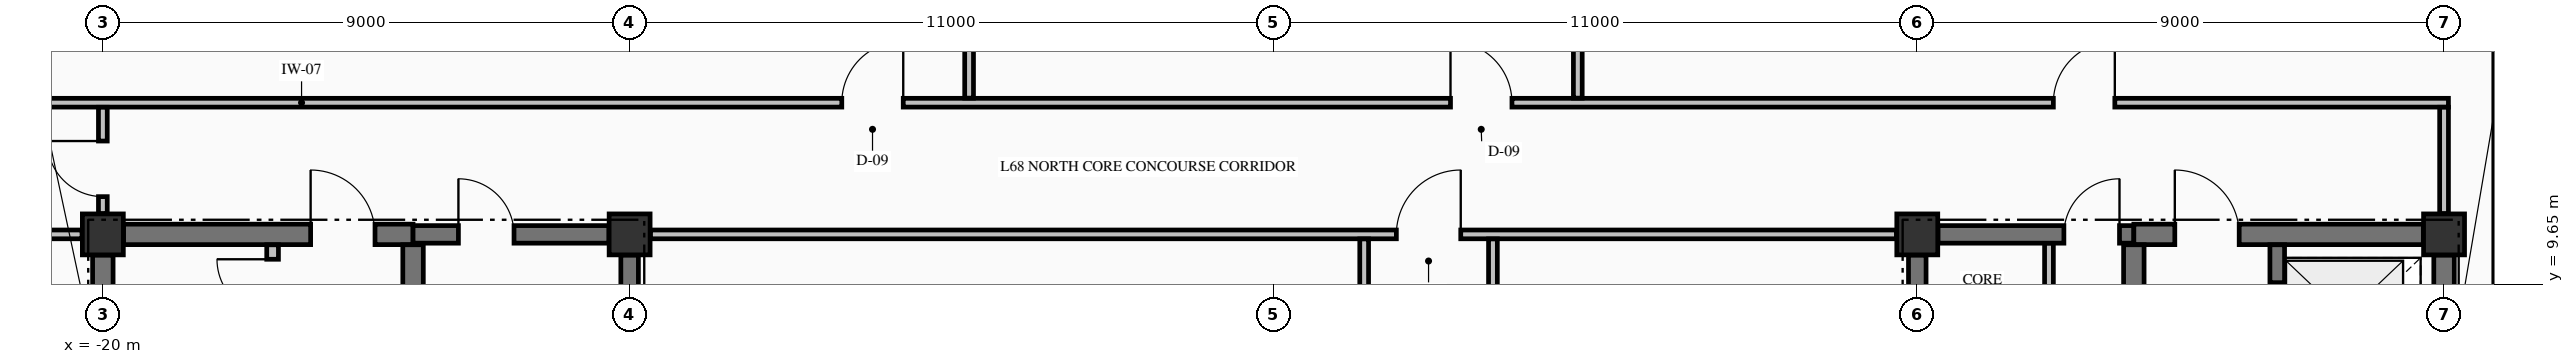
"""IFC4 building model, lengths in metres.
Left out: names, types, materials, properties, quantities, classifications, styles, units other than length and angle.
Written with IfcOpenShell. Run it as: python <this file> out.ifc"""

import sys

from ifc_helpers import new_model, si_unit, direction, frame, frame_2d, origin, origin_2d, place, context, subcontext, project, spatial, rectangle, extrude, element, fill, save


model = new_model("IFC4")
c1 = context("Model", 3, precision=1e-05, world=origin(), true_north=direction((0.0, 1.0)))
c2 = subcontext(c1, "Body", "Model", "MODEL_VIEW")
j1 = project(units=[si_unit("LENGTHUNIT", "METRE"), si_unit("PLANEANGLEUNIT", "RADIAN")], contexts=[c1])
p1 = place(None, origin())
s1 = spatial("IfcSite", under=j1, at=p1, CompositionType="ELEMENT")
p2 = place(p1, origin())
s2 = spatial("IfcBuilding", under=s1, at=p2, CompositionType="ELEMENT")
p3 = place(p2, frame((0.0, 0.0, 257.66)))
s3 = spatial("IfcBuildingStorey", under=s2, at=p3, CompositionType="ELEMENT", Elevation=257.66)
for number, where, z_axis, x_axis in (
    (1, (-20.0, 10.5, -0.25), (0.0, 0.0, 1.0), (1.0, 0.0, 0.0)),
    (2, (-11.0, 10.5, -0.25), (0.0, 0.0, 1.0), (1.0, 0.0, 0.0)),
    (3, (11.0, 10.5, -0.25), (0.0, 0.0, 1.0), (1.0, 0.0, 0.0)),
    (4, (20.0, 10.5, -0.25), (0.0, 0.0, 1.0), (1.0, 0.0, 0.0)),
):
    element("IfcColumn", number, at=place(p3, frame(where, z_axis=z_axis, x_axis=x_axis)), inside=s3, PredefinedType="COLUMN", context=c2, shape_type="SweptSolid", body=[
        extrude(rectangle(XDim=0.7, YDim=0.7, at=origin_2d()), origin(), (0.0, 0.0, 1.0), 3.23),
    ])
p4 = place(p3, frame((21.0, 9.455, 0.0), z_axis=(0.0, 0.0, 1.0), x_axis=(0.0, 1.0, 0.0)))
e5 = element("IfcWall", 5, at=p4, inside=s3, PredefinedType="STANDARD", context=c2, shape_type="SweptSolid", body=[
    extrude(rectangle(XDim=8.09, YDim=0.3, at=frame_2d((4.045, 0.0))), origin(), (0.0, 0.0, 1.0), 2.372),
])
p5 = place(p3, frame((-19.646, 10.5, 0.0), z_axis=(0.0, 0.0, 1.0), x_axis=(1.0, 0.0, 0.0)))
e6 = element("IfcWall", 6, at=p5, inside=s3, PredefinedType="SHEAR", context=c2, shape_type="SweptSolid", body=[
    extrude(rectangle(XDim=4.946, YDim=0.35, at=frame_2d((2.473, 0.0))), origin(), (0.0, 0.0, 1.0), 2.98),
])
p6 = place(p5, frame((3.196, 0.0, 0.0)))
e7 = element("IfcOpeningElement", 7, at=p6, cuts=e6, PredefinedType="OPENING", context=c2, shape_type="SweptSolid", body=[
    extrude(rectangle(XDim=1.1, YDim=2.15, at=frame_2d((0.55, 1.075))), frame((0.0, 0.185, 0.0), z_axis=(0.0, -1.0, 0.0), x_axis=(1.0, 0.0, 0.0)), (0.0, 0.0, 1.0), 0.37),
])
p7 = place(p3, frame((-14.7, 10.5, 0.0), z_axis=(0.0, 0.0, 1.0), x_axis=(1.0, 0.0, 0.0)))
e8 = element("IfcWall", 8, at=p7, inside=s3, PredefinedType="SHEAR", context=c2, shape_type="SweptSolid", body=[
    extrude(rectangle(XDim=3.346, YDim=0.3, at=frame_2d((1.673, 0.0))), origin(), (0.0, 0.0, 1.0), 2.98),
])
p8 = place(p7, frame((0.775, 0.0, 0.0)))
e9 = element("IfcOpeningElement", 9, at=p8, cuts=e8, PredefinedType="OPENING", context=c2, shape_type="SweptSolid", body=[
    extrude(rectangle(XDim=0.95, YDim=2.15, at=frame_2d((0.475, 1.075))), frame((0.0, 0.16, 0.0), z_axis=(0.0, -1.0, 0.0), x_axis=(1.0, 0.0, 0.0)), (0.0, 0.0, 1.0), 0.32),
])
p9 = place(p3, frame((11.354, 10.5, 0.0), z_axis=(0.0, 0.0, 1.0), x_axis=(1.0, 0.0, 0.0)))
e10 = element("IfcWall", 10, at=p9, inside=s3, PredefinedType="SHEAR", context=c2, shape_type="SweptSolid", body=[
    extrude(rectangle(XDim=3.346, YDim=0.3, at=frame_2d((1.673, 0.0))), origin(), (0.0, 0.0, 1.0), 2.98),
])
p10 = place(p9, frame((2.151, 0.0, 0.0)))
e11 = element("IfcOpeningElement", 11, at=p10, cuts=e10, PredefinedType="OPENING", context=c2, shape_type="SweptSolid", body=[
    extrude(rectangle(XDim=0.95, YDim=2.15, at=frame_2d((0.475, 1.075))), frame((0.0, 0.16, 0.0), z_axis=(0.0, -1.0, 0.0), x_axis=(1.0, 0.0, 0.0)), (0.0, 0.0, 1.0), 0.32),
])
p11 = place(p3, frame((14.7, 10.5, 0.0), z_axis=(0.0, 0.0, 1.0), x_axis=(1.0, 0.0, 0.0)))
e12 = element("IfcWall", 12, at=p11, inside=s3, PredefinedType="SHEAR", context=c2, shape_type="SweptSolid", body=[
    extrude(rectangle(XDim=4.946, YDim=0.35, at=frame_2d((2.473, 0.0))), origin(), (0.0, 0.0, 1.0), 2.98),
])
p12 = place(p11, frame((0.7, 0.0, 0.0)))
e13 = element("IfcOpeningElement", 13, at=p12, cuts=e12, PredefinedType="OPENING", context=c2, shape_type="SweptSolid", body=[
    extrude(rectangle(XDim=1.1, YDim=2.15, at=frame_2d((0.55, 1.075))), frame((0.0, 0.185, 0.0), z_axis=(0.0, -1.0, 0.0), x_axis=(1.0, 0.0, 0.0)), (0.0, 0.0, 1.0), 0.37),
])
p13 = place(p3, frame((-25.835, 10.5, 0.0), z_axis=(0.0, 0.0, 1.0), x_axis=(1.0, 0.0, 0.0)))
e14 = element("IfcWall", 14, at=p13, inside=s3, PredefinedType="PARTITIONING", context=c2, shape_type="SweptSolid", body=[
    extrude(rectangle(XDim=5.479, YDim=0.15, at=frame_2d((2.74, 0.0))), origin(), (0.0, 0.0, 1.0), 2.98),
])
p14 = place(p13, frame((2.36, 0.0, 0.0)))
e15 = element("IfcOpeningElement", 15, at=p14, cuts=e14, PredefinedType="OPENING", context=c2, shape_type="SweptSolid", body=[
    extrude(rectangle(XDim=0.95, YDim=2.15, at=frame_2d((0.475, 1.075))), frame((0.0, 0.085, 0.0), z_axis=(0.0, -1.0, 0.0), x_axis=(1.0, 0.0, 0.0)), (0.0, 0.0, 1.0), 0.17),
])
p15 = place(p3, frame((-10.644, 10.5, 0.0), z_axis=(0.0, 0.0, 1.0), x_axis=(1.0, 0.0, 0.0)))
e16 = element("IfcWall", 16, at=p15, inside=s3, PredefinedType="PARTITIONING", context=c2, shape_type="SweptSolid", body=[
    extrude(rectangle(XDim=21.288, YDim=0.15, at=frame_2d((10.644, 0.0))), origin(), (0.0, 0.0, 1.0), 2.98),
])
p16 = place(p15, frame((12.744, 0.0, 0.0)))
e17 = element("IfcOpeningElement", 17, at=p16, cuts=e16, PredefinedType="OPENING", context=c2, shape_type="SweptSolid", body=[
    extrude(rectangle(XDim=1.1, YDim=2.15, at=frame_2d((0.55, 1.075))), frame((0.0, 0.085, 0.0), z_axis=(0.0, -1.0, 0.0), x_axis=(1.0, 0.0, 0.0)), (0.0, 0.0, 1.0), 0.17),
])
p17 = place(p3, frame((-25.835, 12.75, 0.0), z_axis=(0.0, 0.0, 1.0), x_axis=(1.0, 0.0, 0.0)))
e18 = element("IfcWall", 18, at=p17, inside=s3, PredefinedType="PARTITIONING", context=c2, shape_type="SweptSolid", body=[
    extrude(rectangle(XDim=45.91, YDim=0.15, at=frame_2d((22.955, 0.0))), origin(), (0.0, 0.0, 1.0), 2.98),
])
p18 = place(p17, frame((18.46, 0.0, 0.0)))
e19 = element("IfcOpeningElement", 19, at=p18, cuts=e18, PredefinedType="OPENING", context=c2, shape_type="SweptSolid", body=[
    extrude(rectangle(XDim=1.05, YDim=2.15, at=frame_2d((0.525, 1.075))), frame((0.0, 0.085, 0.0), z_axis=(0.0, -1.0, 0.0), x_axis=(1.0, 0.0, 0.0)), (0.0, 0.0, 1.0), 0.17),
])
p19 = place(p17, frame((28.86, 0.0, 0.0)))
e20 = element("IfcOpeningElement", 20, at=p19, cuts=e18, PredefinedType="OPENING", context=c2, shape_type="SweptSolid", body=[
    extrude(rectangle(XDim=1.05, YDim=2.15, at=frame_2d((0.525, 1.075))), frame((0.0, 0.085, 0.0), z_axis=(0.0, -1.0, 0.0), x_axis=(1.0, 0.0, 0.0)), (0.0, 0.0, 1.0), 0.17),
])
p20 = place(p17, frame((39.16, 0.0, 0.0)))
e21 = element("IfcOpeningElement", 21, at=p20, cuts=e18, PredefinedType="OPENING", context=c2, shape_type="SweptSolid", body=[
    extrude(rectangle(XDim=1.05, YDim=2.15, at=frame_2d((0.525, 1.075))), frame((0.0, 0.085, 0.0), z_axis=(0.0, -1.0, 0.0), x_axis=(1.0, 0.0, 0.0)), (0.0, 0.0, 1.0), 0.17),
])
p21 = place(p3, frame((-20.0, 5.327, 0.0), z_axis=(0.0, 0.0, 1.0), x_axis=(0.0, 1.0, 0.0)))
e22 = element("IfcWall", 22, at=p21, inside=s3, PredefinedType="SHEAR", context=c2, shape_type="SweptSolid", body=[
    extrude(rectangle(XDim=4.819, YDim=0.35, at=frame_2d((2.41, 0.0))), origin(), (0.0, 0.0, 1.0), 2.98),
])
p22 = place(p3, frame((-14.7, 5.852, 0.0), z_axis=(0.0, 0.0, 1.0), x_axis=(0.0, 1.0, 0.0)))
e23 = element("IfcWall", 23, at=p22, inside=s3, PredefinedType="SHEAR", context=c2, shape_type="SweptSolid", body=[
    extrude(rectangle(XDim=4.471, YDim=0.35, at=frame_2d((2.235, 0.0))), origin(), (0.0, 0.0, 1.0), 2.98),
])
for number, where, z_axis, x_axis in (
    (24, (-11.0, 5.852, 0.0), (0.0, 0.0, 1.0), (0.0, 1.0, 0.0)),
    (25, (11.0, 5.852, 0.0), (0.0, 0.0, 1.0), (0.0, 1.0, 0.0)),
):
    element("IfcWall", number, at=place(p3, frame(where, z_axis=z_axis, x_axis=x_axis)), inside=s3, PredefinedType="SHEAR", context=c2, shape_type="SweptSolid", body=[
        extrude(rectangle(XDim=4.294, YDim=0.3, at=frame_2d((2.147, 0.0))), origin(), (0.0, 0.0, 1.0), 2.98),
    ])
p23 = place(p3, frame((14.7, 5.852, 0.0), z_axis=(0.0, 0.0, 1.0), x_axis=(0.0, 1.0, 0.0)))
e26 = element("IfcWall", 26, at=p23, inside=s3, PredefinedType="SHEAR", context=c2, shape_type="SweptSolid", body=[
    extrude(rectangle(XDim=4.471, YDim=0.35, at=frame_2d((2.235, 0.0))), origin(), (0.0, 0.0, 1.0), 2.98),
])
p24 = place(p3, frame((17.15, 7.877, 0.0), z_axis=(0.0, 0.0, 1.0), x_axis=(0.0, 1.0, 0.0)))
e27 = element("IfcWall", 27, at=p24, inside=s3, PredefinedType="SOLIDWALL", context=c2, shape_type="SweptSolid", body=[
    extrude(rectangle(XDim=2.446, YDim=0.25, at=frame_2d((1.223, 0.0))), origin(), (0.0, 0.0, 1.0), 2.98),
])
p25 = place(p24, frame((0.698, 0.0, 0.0)))
e28 = element("IfcOpeningElement", 28, at=p25, cuts=e27, PredefinedType="OPENING", context=c2, shape_type="SweptSolid", body=[
    extrude(rectangle(XDim=1.1, YDim=2.2, at=frame_2d((0.55, 1.1))), frame((0.0, 0.135, 0.0), z_axis=(0.0, -1.0, 0.0), x_axis=(1.0, 0.0, 0.0)), (0.0, 0.0, 1.0), 0.27),
])
p26 = place(p3, frame((20.0, 7.877, 0.0), z_axis=(0.0, 0.0, 1.0), x_axis=(0.0, 1.0, 0.0)))
e29 = element("IfcWall", 29, at=p26, inside=s3, PredefinedType="SHEAR", context=c2, shape_type="SweptSolid", body=[
    extrude(rectangle(XDim=2.269, YDim=0.35, at=frame_2d((1.135, 0.0))), origin(), (0.0, 0.0, 1.0), 2.98),
])
p27 = place(p3, frame((-20.0, 10.856, 0.0), z_axis=(0.0, 0.0, 1.0), x_axis=(0.0, 1.0, 0.0)))
e30 = element("IfcWall", 30, at=p27, inside=s3, PredefinedType="PARTITIONING", context=c2, shape_type="SweptSolid", body=[
    extrude(rectangle(XDim=1.816, YDim=0.15, at=frame_2d((0.908, 0.0))), origin(), (0.0, 0.0, 1.0), 2.98),
])
p28 = place(p27, frame((0.289, 0.0, 0.0)))
e31 = element("IfcOpeningElement", 31, at=p28, cuts=e30, PredefinedType="OPENING", context=c2, shape_type="SweptSolid", body=[
    extrude(rectangle(XDim=0.95, YDim=2.15, at=frame_2d((0.475, 1.075))), frame((0.0, 0.085, 0.0), z_axis=(0.0, -1.0, 0.0), x_axis=(1.0, 0.0, 0.0)), (0.0, 0.0, 1.0), 0.17),
])
p29 = place(p3, frame((-17.1, 8.778, 0.0), z_axis=(0.0, 0.0, 1.0), x_axis=(0.0, 1.0, 0.0)))
e32 = element("IfcWall", 32, at=p29, inside=s3, PredefinedType="PARTITIONING", context=c2, shape_type="SweptSolid", body=[
    extrude(rectangle(XDim=1.544, YDim=0.2, at=frame_2d((0.772, 0.0))), origin(), (0.0, 0.0, 1.0), 2.98),
])
p30 = place(p29, frame((0.347, 0.0, 0.0)))
e33 = element("IfcOpeningElement", 33, at=p30, cuts=e32, PredefinedType="OPENING", context=c2, shape_type="SweptSolid", body=[
    extrude(rectangle(XDim=0.95, YDim=2.15, at=frame_2d((0.475, 1.075))), frame((0.0, 0.11, 0.0), z_axis=(0.0, -1.0, 0.0), x_axis=(1.0, 0.0, 0.0)), (0.0, 0.0, 1.0), 0.22),
])
p31 = place(p3, frame((-5.2, 12.828, 0.0), z_axis=(0.0, 0.0, 1.0), x_axis=(0.0, 1.0, 0.0)))
e34 = element("IfcWall", 34, at=p31, inside=s3, PredefinedType="PARTITIONING", context=c2, shape_type="SweptSolid", body=[
    extrude(rectangle(XDim=10.507, YDim=0.15, at=frame_2d((5.253, 0.0))), origin(), (0.0, 0.0, 1.0), 2.98),
])
for number, where, z_axis, x_axis in (
    (35, (1.55, 2.978, 0.0), (0.0, 0.0, 1.0), (0.0, 1.0, 0.0)),
    (36, (3.75, 2.978, 0.0), (0.0, 0.0, 1.0), (0.0, 1.0, 0.0)),
):
    element("IfcWall", number, at=place(p3, frame(where, z_axis=z_axis, x_axis=x_axis)), inside=s3, PredefinedType="PARTITIONING", context=c2, shape_type="SweptSolid", body=[
        extrude(rectangle(XDim=7.444, YDim=0.15, at=frame_2d((3.722, 0.0))), origin(), (0.0, 0.0, 1.0), 2.98),
    ])
p32 = place(p3, frame((5.2, 12.828, 0.0), z_axis=(0.0, 0.0, 1.0), x_axis=(0.0, 1.0, 0.0)))
e37 = element("IfcWall", 37, at=p32, inside=s3, PredefinedType="PARTITIONING", context=c2, shape_type="SweptSolid", body=[
    extrude(rectangle(XDim=10.507, YDim=0.15, at=frame_2d((5.253, 0.0))), origin(), (0.0, 0.0, 1.0), 2.98),
])
p33 = place(p3, frame((13.25, 5.853, 0.0), z_axis=(0.0, 0.0, 1.0), x_axis=(0.0, 1.0, 0.0)))
e38 = element("IfcWall", 38, at=p33, inside=s3, PredefinedType="PARTITIONING", context=c2, shape_type="SweptSolid", body=[
    extrude(rectangle(XDim=4.494, YDim=0.15, at=frame_2d((2.247, 0.0))), origin(), (0.0, 0.0, 1.0), 2.98),
])
p34 = place(p33, frame((1.472, 0.0, 0.0)))
e39 = element("IfcOpeningElement", 39, at=p34, cuts=e38, PredefinedType="OPENING", context=c2, shape_type="SweptSolid", body=[
    extrude(rectangle(XDim=0.95, YDim=2.15, at=frame_2d((0.475, 1.075))), frame((0.0, 0.085, 0.0), z_axis=(0.0, -1.0, 0.0), x_axis=(1.0, 0.0, 0.0)), (0.0, 0.0, 1.0), 0.17),
])
p35 = place(p3, frame((20.0, 10.856, 0.0), z_axis=(0.0, 0.0, 1.0), x_axis=(0.0, 1.0, 0.0)))
e40 = element("IfcWall", 40, at=p35, inside=s3, PredefinedType="PARTITIONING", context=c2, shape_type="SweptSolid", body=[
    extrude(rectangle(XDim=1.816, YDim=0.15, at=frame_2d((0.908, 0.0))), origin(), (0.0, 0.0, 1.0), 2.57),
])
p36 = place(p8, origin())
e41 = element("IfcDoor", 41, at=p36, inside=s3, OperationType="SINGLE_SWING_LEFT", PredefinedType="DOOR", context=c2, shape_type="SweptSolid", body=[
    extrude(rectangle(XDim=0.95, YDim=2.15, at=frame_2d((0.475, 1.075))), frame((0.0, 0.025, 0.0), z_axis=(0.0, -1.0, 0.0), x_axis=(1.0, 0.0, 0.0)), (0.0, 0.0, 1.0), 0.05),
])
fill(e9, e41)
p37 = place(p10, origin())
e42 = element("IfcDoor", 42, at=p37, inside=s3, OperationType="SINGLE_SWING_RIGHT", PredefinedType="DOOR", context=c2, shape_type="SweptSolid", body=[
    extrude(rectangle(XDim=0.95, YDim=2.15, at=frame_2d((0.475, 1.075))), frame((0.0, 0.025, 0.0), z_axis=(0.0, -1.0, 0.0), x_axis=(1.0, 0.0, 0.0)), (0.0, 0.0, 1.0), 0.05),
])
fill(e11, e42)
p38 = place(p6, origin())
e43 = element("IfcDoor", 43, at=p38, inside=s3, OperationType="SINGLE_SWING_LEFT", PredefinedType="DOOR", context=c2, shape_type="SweptSolid", body=[
    extrude(rectangle(XDim=1.1, YDim=2.15, at=frame_2d((0.55, 1.075))), frame((0.0, 0.025, 0.0), z_axis=(0.0, -1.0, 0.0), x_axis=(1.0, 0.0, 0.0)), (0.0, 0.0, 1.0), 0.05),
])
fill(e7, e43)
p39 = place(p30, origin())
e44 = element("IfcDoor", 44, at=p39, inside=s3, OperationType="SINGLE_SWING_RIGHT", PredefinedType="DOOR", context=c2, shape_type="SweptSolid", body=[
    extrude(rectangle(XDim=0.95, YDim=2.15, at=frame_2d((0.475, 1.075))), frame((0.0, 0.025, 0.0), z_axis=(0.0, -1.0, 0.0), x_axis=(1.0, 0.0, 0.0)), (0.0, 0.0, 1.0), 0.05),
])
fill(e33, e44)
p40 = place(p25, origin())
e45 = element("IfcDoor", 45, at=p40, inside=s3, OperationType="SLIDING_TO_RIGHT", PredefinedType="DOOR", context=c2, shape_type="SweptSolid", body=[
    extrude(rectangle(XDim=1.1, YDim=2.2, at=frame_2d((0.55, 1.1))), frame((0.0, 0.025, 0.0), z_axis=(0.0, -1.0, 0.0), x_axis=(1.0, 0.0, 0.0)), (0.0, 0.0, 1.0), 0.05),
])
fill(e28, e45)
p41 = place(p12, origin())
e46 = element("IfcDoor", 46, at=p41, inside=s3, OperationType="SINGLE_SWING_LEFT", PredefinedType="DOOR", context=c2, shape_type="SweptSolid", body=[
    extrude(rectangle(XDim=1.1, YDim=2.15, at=frame_2d((0.55, 1.075))), frame((0.0, 0.025, 0.0), z_axis=(0.0, -1.0, 0.0), x_axis=(1.0, 0.0, 0.0)), (0.0, 0.0, 1.0), 0.05),
])
fill(e13, e46)
p42 = place(p16, origin())
e47 = element("IfcDoor", 47, at=p42, inside=s3, OperationType="SINGLE_SWING_RIGHT", PredefinedType="DOOR", context=c2, shape_type="SweptSolid", body=[
    extrude(rectangle(XDim=1.1, YDim=2.15, at=frame_2d((0.55, 1.075))), frame((0.0, 0.025, 0.0), z_axis=(0.0, -1.0, 0.0), x_axis=(1.0, 0.0, 0.0)), (0.0, 0.0, 1.0), 0.05),
])
fill(e17, e47)
p43 = place(p18, origin())
e48 = element("IfcDoor", 48, at=p43, inside=s3, OperationType="SINGLE_SWING_RIGHT", PredefinedType="DOOR", context=c2, shape_type="SweptSolid", body=[
    extrude(rectangle(XDim=1.05, YDim=2.15, at=frame_2d((0.525, 1.075))), frame((0.0, 0.025, 0.0), z_axis=(0.0, -1.0, 0.0), x_axis=(1.0, 0.0, 0.0)), (0.0, 0.0, 1.0), 0.05),
])
fill(e19, e48)
p44 = place(p19, origin())
e49 = element("IfcDoor", 49, at=p44, inside=s3, OperationType="SINGLE_SWING_LEFT", PredefinedType="DOOR", context=c2, shape_type="SweptSolid", body=[
    extrude(rectangle(XDim=1.05, YDim=2.15, at=frame_2d((0.525, 1.075))), frame((0.0, 0.025, 0.0), z_axis=(0.0, -1.0, 0.0), x_axis=(1.0, 0.0, 0.0)), (0.0, 0.0, 1.0), 0.05),
])
fill(e20, e49)
p45 = place(p20, origin())
e50 = element("IfcDoor", 50, at=p45, inside=s3, OperationType="SINGLE_SWING_RIGHT", PredefinedType="DOOR", context=c2, shape_type="SweptSolid", body=[
    extrude(rectangle(XDim=1.05, YDim=2.15, at=frame_2d((0.525, 1.075))), frame((0.0, 0.025, 0.0), z_axis=(0.0, -1.0, 0.0), x_axis=(1.0, 0.0, 0.0)), (0.0, 0.0, 1.0), 0.05),
])
fill(e21, e50)
p46 = place(p28, origin())
e51 = element("IfcDoor", 51, at=p46, inside=s3, OperationType="SINGLE_SWING_RIGHT", PredefinedType="DOOR", context=c2, shape_type="SweptSolid", body=[
    extrude(rectangle(XDim=0.95, YDim=2.15, at=frame_2d((0.475, 1.075))), frame((0.0, 0.025, 0.0), z_axis=(0.0, -1.0, 0.0), x_axis=(1.0, 0.0, 0.0)), (0.0, 0.0, 1.0), 0.05),
])
fill(e31, e51)
save(model, sys.argv[1])
